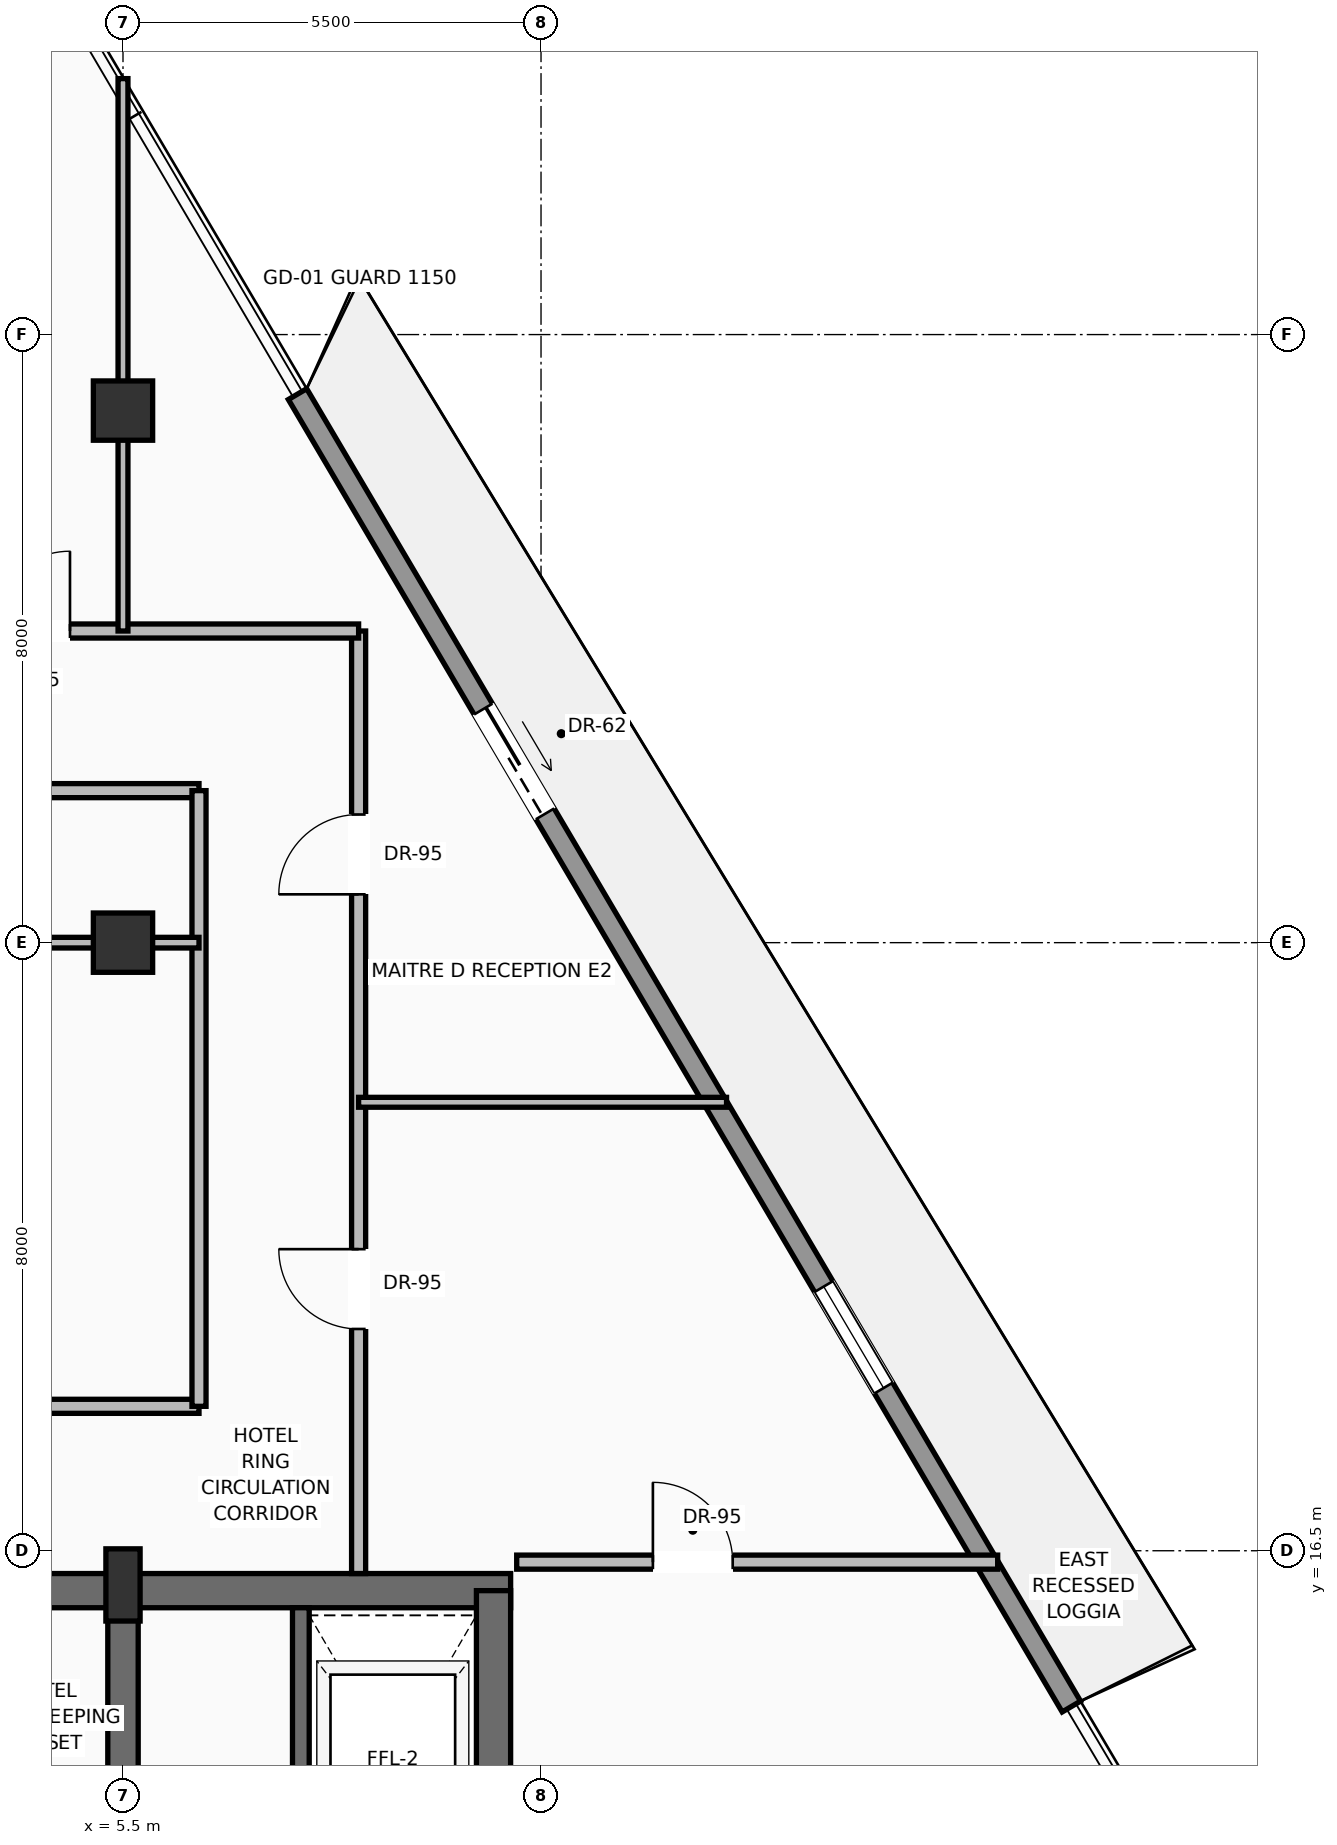
"""IFC4 building model, lengths in metres.
Left out: names, types, materials, properties, quantities, classifications, styles, units other than length and angle.
Written with IfcOpenShell. Run it as: python <this file> out.ifc"""

import sys

from ifc_helpers import new_model, si_unit, direction, frame, frame_2d, origin, origin_2d, place, context, subcontext, project, spatial, rectangle, extrude, source, transform, mapped, element, fill, save


model = new_model("IFC4")
c1 = context("Model", 3, precision=1e-05, world=origin(), true_north=direction((0.0, 1.0)))
c2 = subcontext(c1, "Body", "Model", "MODEL_VIEW")
j1 = project(units=[si_unit("LENGTHUNIT", "METRE"), si_unit("PLANEANGLEUNIT", "RADIAN")], contexts=[c1])
p1 = place(None, origin())
s1 = spatial("IfcSite", under=j1, at=p1, CompositionType="ELEMENT")
p2 = place(p1, origin())
s2 = spatial("IfcBuilding", under=s1, at=p2, CompositionType="ELEMENT")
p3 = place(p2, frame((0.0, 0.0, 279.9)))
s3 = spatial("IfcBuildingStorey", under=s2, at=p3, CompositionType="ELEMENT", Elevation=279.9)
p4 = place(p3, frame((-10.6, 15.975, 0.0), z_axis=(0.0, 0.0, 1.0), x_axis=(1.0, 0.0, 0.0)))
e1 = element("IfcWall", 1, at=p4, inside=s3, PredefinedType="SHEAR", context=c2, shape_type="SweptSolid", body=[
    extrude(rectangle(XDim=21.2, YDim=0.45, at=frame_2d((10.6, 0.0))), origin(), (0.0, 0.0, 1.0), 3.24),
])
p5 = place(p4, frame((3.17, 0.0, 0.0)))
e2 = element("IfcOpeningElement", 2, at=p5, cuts=e1, PredefinedType="OPENING", context=c2, shape_type="SweptSolid", body=[
    extrude(rectangle(XDim=1.3, YDim=2.3, at=frame_2d((0.65, 1.15))), frame((0.0, 0.235, 0.0), z_axis=(0.0, -1.0, 0.0), x_axis=(1.0, 0.0, 0.0)), (0.0, 0.0, 1.0), 0.47),
])
p6 = place(p4, frame((9.6, 0.0, 0.0)))
e3 = element("IfcOpeningElement", 3, at=p6, cuts=e1, PredefinedType="OPENING", context=c2, shape_type="SweptSolid", body=[
    extrude(rectangle(XDim=2.0, YDim=2.4, at=frame_2d((1.0, 1.2))), frame((0.0, 0.235, 0.0), z_axis=(0.0, -1.0, 0.0), x_axis=(1.0, 0.0, 0.0)), (0.0, 0.0, 1.0), 0.47),
])
p7 = place(p3, frame((10.375, 0.625, 0.0), z_axis=(0.0, 0.0, 1.0), x_axis=(0.0, 1.0, 0.0)))
e4 = element("IfcWall", 4, at=p7, inside=s3, PredefinedType="SHEAR", context=c2, shape_type="SweptSolid", body=[
    extrude(rectangle(XDim=15.35, YDim=0.45, at=frame_2d((7.675, 0.0))), origin(), (0.0, 0.0, 1.0), 3.24),
])
p8 = place(p3, frame((5.5, 0.625, 0.0), z_axis=(0.0, 0.0, 1.0), x_axis=(0.0, 1.0, 0.0)))
e5 = element("IfcWall", 5, at=p8, inside=s3, PredefinedType="SHEAR", context=c2, shape_type="SweptSolid", body=[
    extrude(rectangle(XDim=15.35, YDim=0.4, at=frame_2d((7.675, 0.0))), origin(), (0.0, 0.0, 1.0), 3.24),
])
p9 = place(p8, frame((8.875, 0.0, 0.0)))
e6 = element("IfcOpeningElement", 6, at=p9, cuts=e5, PredefinedType="OPENING", context=c2, shape_type="SweptSolid", body=[
    extrude(rectangle(XDim=1.1, YDim=2.2, at=frame_2d((0.55, 1.1))), frame((0.0, 0.21, 0.0), z_axis=(0.0, -1.0, 0.0), x_axis=(1.0, 0.0, 0.0)), (0.0, 0.0, 1.0), 0.42),
])
m1 = source(origin(), c2, "Body", "SweptSolid", [
    extrude(rectangle(XDim=0.45, YDim=0.95, at=origin_2d()), origin(), (0.0, 0.0, 1.0), 3.45),
])
p10 = place(p3, frame((5.5, 16.05, 0.0), z_axis=(0.0, 0.0, 1.0), x_axis=(1.0, 0.0, 0.0)))
e7 = element("IfcColumn", 7, at=p10, inside=s3, PredefinedType="PILASTER", context=c2, shape_type="MappedRepresentation", body=[
    mapped(m1, transform((0.0, 0.0, 0.0), scale=1.0)),
])
m2 = source(origin(), c2, "Body", "SweptSolid", [
    extrude(rectangle(XDim=0.78, YDim=0.78, at=origin_2d()), origin(), (0.0, 0.0, 1.0), 3.45),
])
for number, where, z_axis, x_axis in (
    (8, (5.5, 24.5, 0.0), (0.0, 0.0, 1.0), (1.0, 0.0, 0.0)),
    (9, (5.5, 31.5, 0.0), (0.0, 0.0, 1.0), (1.0, 0.0, 0.0)),
):
    element("IfcColumn", number, at=place(p3, frame(where, z_axis=z_axis, x_axis=x_axis)), inside=s3, PredefinedType="COLUMN", context=c2, shape_type="MappedRepresentation", body=[
        mapped(m2, transform((0.0, 0.0, 0.0), scale=1.0)),
    ])
p11 = place(p3, frame((7.796, 31.717, 0.0), z_axis=(0.0, 0.0, 1.0), x_axis=(0.507930566701, -0.861398014515, 0.0)))
e10 = element("IfcWall", 10, at=p11, inside=s3, PredefinedType="SOLIDWALL", context=c2, shape_type="SweptSolid", body=[
    extrude(rectangle(XDim=20.045, YDim=0.28, at=frame_2d((10.022, 0.0))), origin(), (0.0, 0.0, 1.0), 2.82),
])
p12 = place(p11, frame((4.811, 0.0, 0.0)))
e11 = element("IfcOpeningElement", 11, at=p12, cuts=e10, PredefinedType="OPENING", context=c2, shape_type="SweptSolid", body=[
    extrude(rectangle(XDim=1.6, YDim=2.35, at=frame_2d((0.8, 1.175))), frame((0.0, 0.15, 0.0), z_axis=(0.0, -1.0, 0.0), x_axis=(1.0, 0.0, 0.0)), (0.0, 0.0, 1.0), 0.3),
])
p13 = place(p11, frame((13.63, 0.0, 0.9)))
e12 = element("IfcOpeningElement", 12, at=p13, cuts=e10, PredefinedType="OPENING", context=c2, shape_type="SweptSolid", body=[
    extrude(rectangle(XDim=1.55, YDim=1.75, at=frame_2d((0.775, 0.875))), frame((0.0, 0.15, 0.0), z_axis=(0.0, -1.0, 0.0), x_axis=(1.0, 0.0, 0.0)), (0.0, 0.0, 1.0), 0.3),
])
p14 = place(p3, frame((7.84, 11.87, 0.0), z_axis=(0.0, 0.0, 1.0), x_axis=(0.0, 1.0, 0.0)))
e13 = element("IfcWall", 13, at=p14, inside=s3, PredefinedType="SOLIDWALL", context=c2, shape_type="SweptSolid", body=[
    extrude(rectangle(XDim=3.88, YDim=0.22, at=frame_2d((1.94, 0.0))), origin(), (0.0, 0.0, 1.0), 3.24),
])
p15 = place(p3, frame((-5.95, 18.4, 0.0), z_axis=(0.0, 0.0, 1.0), x_axis=(1.0, 0.0, 0.0)))
e14 = element("IfcWall", 14, at=p15, inside=s3, PredefinedType="PARTITIONING", context=c2, shape_type="SweptSolid", body=[
    extrude(rectangle(XDim=12.45, YDim=0.185, at=frame_2d((6.225, 0.0))), origin(), (0.0, 0.0, 1.0), 3.232),
])
p16 = place(p15, frame((5.75, 0.0, 0.0)))
e15 = element("IfcOpeningElement", 15, at=p16, cuts=e14, PredefinedType="OPENING", context=c2, shape_type="SweptSolid", body=[
    extrude(rectangle(XDim=0.95, YDim=2.2, at=frame_2d((0.475, 1.1))), frame((0.0, 0.103, 0.0), z_axis=(0.0, -1.0, 0.0), x_axis=(1.0, 0.0, 0.0)), (0.0, 0.0, 1.0), 0.205),
])
p17 = place(p3, frame((-5.95, 26.5, 0.0), z_axis=(0.0, 0.0, 1.0), x_axis=(1.0, 0.0, 0.0)))
e16 = element("IfcWall", 16, at=p17, inside=s3, PredefinedType="PARTITIONING", context=c2, shape_type="SweptSolid", body=[
    extrude(rectangle(XDim=12.45, YDim=0.185, at=frame_2d((6.225, 0.0))), origin(), (0.0, 0.0, 1.0), 3.232),
])
p18 = place(p17, frame((5.75, 0.0, 0.0)))
e17 = element("IfcOpeningElement", 17, at=p18, cuts=e16, PredefinedType="OPENING", context=c2, shape_type="SweptSolid", body=[
    extrude(rectangle(XDim=0.95, YDim=2.2, at=frame_2d((0.475, 1.1))), frame((0.0, 0.103, 0.0), z_axis=(0.0, -1.0, 0.0), x_axis=(1.0, 0.0, 0.0)), (0.0, 0.0, 1.0), 0.205),
])
p19 = place(p3, frame((6.5, 18.4, 0.0), z_axis=(0.0, 0.0, 1.0), x_axis=(0.0, 1.0, 0.0)))
e18 = element("IfcWall", 18, at=p19, inside=s3, PredefinedType="PARTITIONING", context=c2, shape_type="SweptSolid", body=[
    extrude(rectangle(XDim=8.1, YDim=0.185, at=frame_2d((4.05, 0.0))), origin(), (0.0, 0.0, 1.0), 3.232),
])
p20 = place(p3, frame((8.6, 16.2, 0.0), z_axis=(0.0, 0.0, 1.0), x_axis=(0.0, 1.0, 0.0)))
e19 = element("IfcWall", 19, at=p20, inside=s3, PredefinedType="PARTITIONING", context=c2, shape_type="SweptSolid", body=[
    extrude(rectangle(XDim=12.4, YDim=0.185, at=frame_2d((6.2, 0.0))), origin(), (0.0, 0.0, 1.0), 3.232),
])
p21 = place(p20, frame((3.218, 0.0, 0.0)))
e20 = element("IfcOpeningElement", 20, at=p21, cuts=e19, PredefinedType="OPENING", context=c2, shape_type="SweptSolid", body=[
    extrude(rectangle(XDim=1.05, YDim=2.25, at=frame_2d((0.525, 1.125))), frame((0.0, 0.103, 0.0), z_axis=(0.0, -1.0, 0.0), x_axis=(1.0, 0.0, 0.0)), (0.0, 0.0, 1.0), 0.205),
])
p22 = place(p20, frame((8.936, 0.0, 0.0)))
e21 = element("IfcOpeningElement", 21, at=p22, cuts=e19, PredefinedType="OPENING", context=c2, shape_type="SweptSolid", body=[
    extrude(rectangle(XDim=1.05, YDim=2.25, at=frame_2d((0.525, 1.125))), frame((0.0, 0.103, 0.0), z_axis=(0.0, -1.0, 0.0), x_axis=(1.0, 0.0, 0.0)), (0.0, 0.0, 1.0), 0.205),
])
p23 = place(p3, frame((-8.05, 28.6, 0.0), z_axis=(0.0, 0.0, 1.0), x_axis=(1.0, 0.0, 0.0)))
e22 = element("IfcWall", 22, at=p23, inside=s3, PredefinedType="PARTITIONING", context=c2, shape_type="SweptSolid", body=[
    extrude(rectangle(XDim=16.65, YDim=0.185, at=frame_2d((8.325, 0.0))), origin(), (0.0, 0.0, 1.0), 3.232),
])
p24 = place(p23, frame((3.248, 0.0, 0.0)))
e23 = element("IfcOpeningElement", 23, at=p24, cuts=e22, PredefinedType="OPENING", context=c2, shape_type="SweptSolid", body=[
    extrude(rectangle(XDim=1.05, YDim=2.25, at=frame_2d((0.525, 1.125))), frame((0.0, 0.103, 0.0), z_axis=(0.0, -1.0, 0.0), x_axis=(1.0, 0.0, 0.0)), (0.0, 0.0, 1.0), 0.205),
])
p25 = place(p23, frame((7.8, 0.0, 0.0)))
e24 = element("IfcOpeningElement", 24, at=p25, cuts=e22, PredefinedType="OPENING", context=c2, shape_type="SweptSolid", body=[
    extrude(rectangle(XDim=1.05, YDim=2.25, at=frame_2d((0.525, 1.125))), frame((0.0, 0.103, 0.0), z_axis=(0.0, -1.0, 0.0), x_axis=(1.0, 0.0, 0.0)), (0.0, 0.0, 1.0), 0.205),
])
p26 = place(p23, frame((11.802, 0.0, 0.0)))
e25 = element("IfcOpeningElement", 25, at=p26, cuts=e22, PredefinedType="OPENING", context=c2, shape_type="SweptSolid", body=[
    extrude(rectangle(XDim=1.05, YDim=2.25, at=frame_2d((0.525, 1.125))), frame((0.0, 0.103, 0.0), z_axis=(0.0, -1.0, 0.0), x_axis=(1.0, 0.0, 0.0)), (0.0, 0.0, 1.0), 0.205),
])
p27 = place(p23, frame((0.802, 0.0, 0.0)))
e26 = element("IfcOpeningElement", 26, at=p27, cuts=e22, PredefinedType="OPENING", context=c2, shape_type="SweptSolid", body=[
    extrude(rectangle(XDim=1.05, YDim=2.25, at=frame_2d((0.525, 1.125))), frame((0.0, 0.103, 0.0), z_axis=(0.0, -1.0, 0.0), x_axis=(1.0, 0.0, 0.0)), (0.0, 0.0, 1.0), 0.205),
])
p28 = place(p3, frame((-5.95, 24.5, 0.0), z_axis=(0.0, 0.0, 1.0), x_axis=(1.0, 0.0, 0.0)))
e27 = element("IfcWall", 27, at=p28, inside=s3, PredefinedType="PARTITIONING", context=c2, shape_type="SweptSolid", body=[
    extrude(rectangle(XDim=12.45, YDim=0.14, at=frame_2d((6.225, 0.0))), origin(), (0.0, 0.0, 1.0), 2.683),
])
p29 = place(p3, frame((10.68, 16.35, 0.0), z_axis=(0.0, 0.0, 1.0), x_axis=(1.0, 0.0, 0.0)))
e28 = element("IfcWall", 28, at=p29, inside=s3, PredefinedType="PARTITIONING", context=c2, shape_type="SweptSolid", body=[
    extrude(rectangle(XDim=6.328, YDim=0.185, at=frame_2d((3.164, 0.0))), origin(), (0.0, 0.0, 1.0), 3.232),
])
p30 = place(p29, frame((1.792, 0.0, 0.0)))
e29 = element("IfcOpeningElement", 29, at=p30, cuts=e28, PredefinedType="OPENING", context=c2, shape_type="SweptSolid", body=[
    extrude(rectangle(XDim=1.05, YDim=2.25, at=frame_2d((0.525, 1.125))), frame((0.0, 0.103, 0.0), z_axis=(0.0, -1.0, 0.0), x_axis=(1.0, 0.0, 0.0)), (0.0, 0.0, 1.0), 0.205),
])
p31 = place(p3, frame((5.5, 28.6, 0.0), z_axis=(0.0, 0.0, 1.0), x_axis=(0.0, 1.0, 0.0)))
e30 = element("IfcWall", 30, at=p31, inside=s3, PredefinedType="PARTITIONING", context=c2, shape_type="SweptSolid", body=[
    extrude(rectangle(XDim=7.267, YDim=0.13, at=frame_2d((3.634, 0.0))), origin(), (0.0, 0.0, 1.0), 2.683),
])
p32 = place(p3, frame((8.6, 22.4, 0.0), z_axis=(0.0, 0.0, 1.0), x_axis=(1.0, 0.0, 0.0)))
e31 = element("IfcWall", 31, at=p32, inside=s3, PredefinedType="PARTITIONING", context=c2, shape_type="SweptSolid", body=[
    extrude(rectangle(XDim=4.841, YDim=0.13, at=frame_2d((2.42, 0.0))), origin(), (0.0, 0.0, 1.0), 3.232),
])
m3 = source(origin(), c2, "Body", "SweptSolid", [
    extrude(rectangle(XDim=1.6, YDim=2.35, at=frame_2d((0.8, 1.175))), frame((0.0, 0.025, 0.0), z_axis=(0.0, -1.0, 0.0), x_axis=(1.0, 0.0, 0.0)), (0.0, 0.0, 1.0), 0.05),
])
p33 = place(p12, origin())
e32 = element("IfcDoor", 32, at=p33, inside=s3, OperationType="SLIDING_TO_RIGHT", PredefinedType="DOOR", context=c2, shape_type="MappedRepresentation", body=[
    mapped(m3, transform((0.0, 0.0, 0.0), scale=1.0)),
])
fill(e11, e32)
m4 = source(origin(), c2, "Body", "SweptSolid", [
    extrude(rectangle(XDim=1.55, YDim=1.75, at=frame_2d((0.775, 0.875))), frame((0.0, 0.03, 0.0), z_axis=(0.0, -1.0, 0.0), x_axis=(1.0, 0.0, 0.0)), (0.0, 0.0, 1.0), 0.06),
])
p34 = place(p13, origin())
e33 = element("IfcWindow", 33, at=p34, inside=s3, PartitioningType="SINGLE_PANEL", PredefinedType="WINDOW", context=c2, shape_type="MappedRepresentation", body=[
    mapped(m4, transform((0.0, 0.0, 0.0), scale=1.0)),
])
fill(e12, e33)
m5 = source(origin(), c2, "Body", "SweptSolid", [
    extrude(rectangle(XDim=1.05, YDim=2.25, at=frame_2d((0.525, 1.125))), frame((0.0, 0.025, 0.0), z_axis=(0.0, -1.0, 0.0), x_axis=(1.0, 0.0, 0.0)), (0.0, 0.0, 1.0), 0.05),
])
p35 = place(p30, origin())
e34 = element("IfcDoor", 34, at=p35, inside=s3, OperationType="SINGLE_SWING_LEFT", PredefinedType="DOOR", context=c2, shape_type="MappedRepresentation", body=[
    mapped(m5, transform((0.0, 0.0, 0.0), scale=1.0)),
])
fill(e29, e34)
p36 = place(p21, origin())
e35 = element("IfcDoor", 35, at=p36, inside=s3, OperationType="SINGLE_SWING_RIGHT", PredefinedType="DOOR", context=c2, shape_type="MappedRepresentation", body=[
    mapped(m5, transform((0.0, 0.0, 0.0), scale=1.0)),
])
fill(e20, e35)
p37 = place(p22, origin())
e36 = element("IfcDoor", 36, at=p37, inside=s3, OperationType="SINGLE_SWING_LEFT", PredefinedType="DOOR", context=c2, shape_type="MappedRepresentation", body=[
    mapped(m5, transform((0.0, 0.0, 0.0), scale=1.0)),
])
fill(e21, e36)
p38 = place(p26, origin())
e37 = element("IfcDoor", 37, at=p38, inside=s3, OperationType="SINGLE_SWING_RIGHT", PredefinedType="DOOR", context=c2, shape_type="MappedRepresentation", body=[
    mapped(m5, transform((0.0, 0.0, 0.0), scale=1.0)),
])
fill(e25, e37)
save(model, sys.argv[1])
